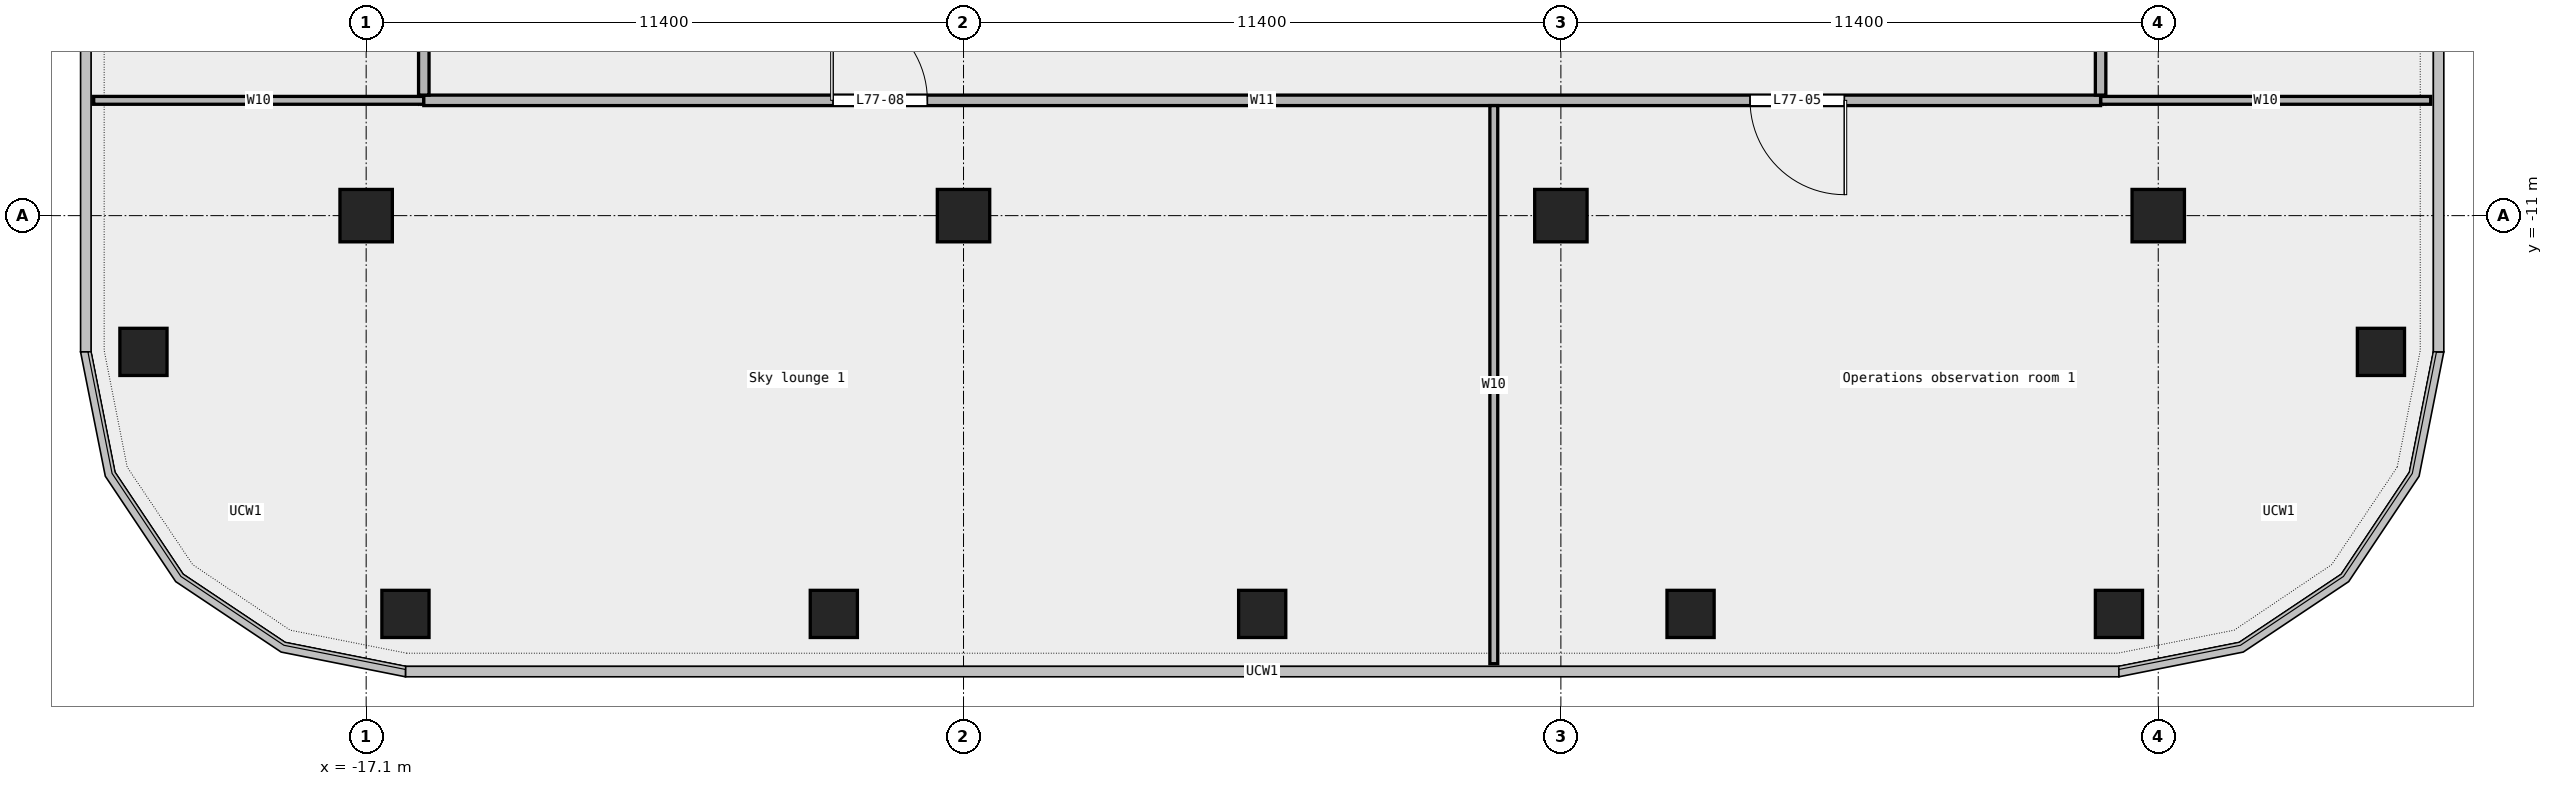
"""IFC4 building model, lengths in metres.
Left out: names, types, materials, properties, quantities, classifications, styles, units other than length and angle.
Written with IfcOpenShell. Run it as: python <this file> out.ifc"""

import sys

from ifc_helpers import new_model, si_unit, direction, frame, frame_2d, origin, origin_2d, place, context, subcontext, project, spatial, rectangle, extrude, element, fill, save


model = new_model("IFC4")
c1 = context("Model", 3, precision=1e-05, world=origin(), true_north=direction((0.0, 1.0)))
c2 = subcontext(c1, "Body", "Model", "MODEL_VIEW")
j1 = project(units=[si_unit("LENGTHUNIT", "METRE"), si_unit("PLANEANGLEUNIT", "RADIAN")], contexts=[c1])
p1 = place(None, origin())
s1 = spatial("IfcSite", under=j1, at=p1, CompositionType="ELEMENT")
p2 = place(p1, origin())
s2 = spatial("IfcBuilding", under=s1, at=p2, CompositionType="ELEMENT")
p3 = place(p2, frame((0.0, 0.0, 353.4)))
s3 = spatial("IfcBuildingStorey", under=s2, at=p3, CompositionType="ELEMENT", Elevation=353.4)
for number, where, z_axis, x_axis in (
    (1, (-16.35, -18.6, 0.0), (0.0, 0.0, 1.0), (1.0, 0.0, 0.0)),
    (2, (-8.175, -18.6, 0.0), (0.0, 0.0, 1.0), (1.0, 0.0, 0.0)),
    (3, (0.0, -18.6, 0.0), (0.0, 0.0, 1.0), (1.0, 0.0, 0.0)),
    (4, (8.175, -18.6, 0.0), (0.0, 0.0, 1.0), (1.0, 0.0, 0.0)),
    (5, (16.35, -18.6, 0.0), (0.0, 0.0, 1.0), (1.0, 0.0, 0.0)),
    (6, (21.35, -13.6, 0.0), (0.0, 0.0, 1.0), (1.0, 0.0, 0.0)),
    (7, (-21.35, -13.6, 0.0), (0.0, 0.0, 1.0), (1.0, 0.0, 0.0)),
):
    element("IfcColumn", number, at=place(p3, frame(where, z_axis=z_axis, x_axis=x_axis)), inside=s3, PredefinedType="COLUMN", context=c2, shape_type="SweptSolid", body=[
        extrude(rectangle(XDim=0.9, YDim=0.9, at=origin_2d()), origin(), (0.0, 0.0, 1.0), 3.6),
    ])
for number, where, z_axis, x_axis in (
    (8, (-17.1, -11.0, 0.0), (0.0, 0.0, 1.0), (1.0, 0.0, 0.0)),
    (9, (-5.7, -11.0, 0.0), (0.0, 0.0, 1.0), (1.0, 0.0, 0.0)),
    (10, (5.7, -11.0, 0.0), (0.0, 0.0, 1.0), (1.0, 0.0, 0.0)),
    (11, (17.1, -11.0, 0.0), (0.0, 0.0, 1.0), (1.0, 0.0, 0.0)),
):
    element("IfcColumn", number, at=place(p3, frame(where, z_axis=z_axis, x_axis=x_axis)), inside=s3, PredefinedType="COLUMN", context=c2, shape_type="SweptSolid", body=[
        extrude(rectangle(XDim=1.0, YDim=1.0, at=origin_2d()), origin(), (0.0, 0.0, 1.0), 3.6),
    ])
for number, where, z_axis, x_axis in (
    (12, (-22.3, -8.8, 0.0), (0.0, 0.0, 1.0), (1.0, 0.0, 0.0)),
    (13, (16.0, -8.8, 0.0), (0.0, 0.0, 1.0), (1.0, 0.0, 0.0)),
):
    element("IfcWall", number, at=place(p3, frame(where, z_axis=z_axis, x_axis=x_axis)), inside=s3, PredefinedType="PARTITIONING", context=c2, shape_type="SweptSolid", body=[
        extrude(rectangle(XDim=6.3, YDim=0.15, at=frame_2d((3.15, 0.0))), origin(), (0.0, 0.0, 1.0), 3.6),
    ])
p4 = place(p3, frame((-16.0, -8.8, 0.0), z_axis=(0.0, 0.0, 1.0), x_axis=(1.0, 0.0, 0.0)))
e14 = element("IfcWall", 14, at=p4, inside=s3, PredefinedType="PARTITIONING", context=c2, shape_type="SweptSolid", body=[
    extrude(rectangle(XDim=32.0, YDim=0.2, at=frame_2d((16.0, 0.0))), origin(), (0.0, 0.0, 1.0), 3.6),
])
p5 = place(p4, frame((25.31, 0.0, 0.0)))
e15 = element("IfcOpeningElement", 15, at=p5, cuts=e14, PredefinedType="OPENING", context=c2, shape_type="SweptSolid", body=[
    extrude(rectangle(XDim=1.8, YDim=2.1, at=frame_2d((0.9, 1.05))), frame((0.0, 0.112, 0.0), z_axis=(0.0, -1.0, 0.0), x_axis=(1.0, 0.0, 0.0)), (0.0, 0.0, 1.0), 0.224),
])
p6 = place(p4, frame((7.81, 0.0, 0.0)))
e16 = element("IfcOpeningElement", 16, at=p6, cuts=e14, PredefinedType="OPENING", context=c2, shape_type="SweptSolid", body=[
    extrude(rectangle(XDim=1.8, YDim=2.1, at=frame_2d((0.9, 1.05))), frame((0.0, 0.112, 0.0), z_axis=(0.0, -1.0, 0.0), x_axis=(1.0, 0.0, 0.0)), (0.0, 0.0, 1.0), 0.224),
])
p7 = place(p3, frame((-16.0, -8.7, 0.0), z_axis=(0.0, 0.0, 1.0), x_axis=(0.0, 1.0, 0.0)))
e17 = element("IfcWall", 17, at=p7, inside=s3, PredefinedType="PARTITIONING", context=c2, shape_type="SweptSolid", body=[
    extrude(rectangle(XDim=23.7, YDim=0.2, at=frame_2d((11.85, 0.0))), origin(), (0.0, 0.0, 1.0), 3.6),
])
p8 = place(p7, frame((5.325, 0.0, 0.0)))
e18 = element("IfcOpeningElement", 18, at=p8, cuts=e17, PredefinedType="OPENING", context=c2, shape_type="SweptSolid", body=[
    extrude(rectangle(XDim=1.2, YDim=2.1, at=frame_2d((0.6, 1.05))), frame((0.0, 0.112, 0.0), z_axis=(0.0, -1.0, 0.0), x_axis=(1.0, 0.0, 0.0)), (0.0, 0.0, 1.0), 0.224),
])
p9 = place(p7, frame((17.175, 0.0, 0.0)))
e19 = element("IfcOpeningElement", 19, at=p9, cuts=e17, PredefinedType="OPENING", context=c2, shape_type="SweptSolid", body=[
    extrude(rectangle(XDim=1.2, YDim=2.1, at=frame_2d((0.6, 1.05))), frame((0.0, 0.112, 0.0), z_axis=(0.0, -1.0, 0.0), x_axis=(1.0, 0.0, 0.0)), (0.0, 0.0, 1.0), 0.224),
])
p10 = place(p3, frame((4.42, -19.55, 0.0), z_axis=(0.0, 0.0, 1.0), x_axis=(0.0, 1.0, 0.0)))
e20 = element("IfcWall", 20, at=p10, inside=s3, PredefinedType="PARTITIONING", context=c2, shape_type="SweptSolid", body=[
    extrude(rectangle(XDim=10.65, YDim=0.15, at=frame_2d((5.325, 0.0))), origin(), (0.0, 0.0, 1.0), 3.6),
])
p11 = place(p3, frame((16.0, -8.7, 0.0), z_axis=(0.0, 0.0, 1.0), x_axis=(0.0, 1.0, 0.0)))
e21 = element("IfcWall", 21, at=p11, inside=s3, PredefinedType="PARTITIONING", context=c2, shape_type="SweptSolid", body=[
    extrude(rectangle(XDim=23.7, YDim=0.2, at=frame_2d((11.85, 0.0))), origin(), (0.0, 0.0, 1.0), 3.6),
])
p12 = place(p11, frame((16.633, 0.0, 0.0)))
e22 = element("IfcOpeningElement", 22, at=p12, cuts=e21, PredefinedType="OPENING", context=c2, shape_type="SweptSolid", body=[
    extrude(rectangle(XDim=1.2, YDim=2.1, at=frame_2d((0.6, 1.05))), frame((0.0, 0.112, 0.0), z_axis=(0.0, -1.0, 0.0), x_axis=(1.0, 0.0, 0.0)), (0.0, 0.0, 1.0), 0.224),
])
p13 = place(p11, frame((4.883, 0.0, 0.0)))
e23 = element("IfcOpeningElement", 23, at=p13, cuts=e21, PredefinedType="OPENING", context=c2, shape_type="SweptSolid", body=[
    extrude(rectangle(XDim=1.0, YDim=2.1, at=frame_2d((0.5, 1.05))), frame((0.0, 0.112, 0.0), z_axis=(0.0, -1.0, 0.0), x_axis=(1.0, 0.0, 0.0)), (0.0, 0.0, 1.0), 0.224),
])
p14 = place(p5, origin())
e24 = element("IfcDoor", 24, at=p14, inside=s3, OperationType="DOUBLE_DOOR_SINGLE_SWING", PredefinedType="DOOR", context=c2, shape_type="SweptSolid", body=[
    extrude(rectangle(XDim=1.8, YDim=2.1, at=frame_2d((0.9, 1.05))), frame((0.0, 0.025, 0.0), z_axis=(0.0, -1.0, 0.0), x_axis=(1.0, 0.0, 0.0)), (0.0, 0.0, 1.0), 0.05),
])
fill(e15, e24)
p15 = place(p6, origin())
e25 = element("IfcDoor", 25, at=p15, inside=s3, OperationType="DOUBLE_DOOR_SINGLE_SWING", PredefinedType="DOOR", context=c2, shape_type="SweptSolid", body=[
    extrude(rectangle(XDim=1.8, YDim=2.1, at=frame_2d((0.9, 1.05))), frame((0.0, 0.025, 0.0), z_axis=(0.0, -1.0, 0.0), x_axis=(1.0, 0.0, 0.0)), (0.0, 0.0, 1.0), 0.05),
])
fill(e16, e25)
save(model, sys.argv[1])
